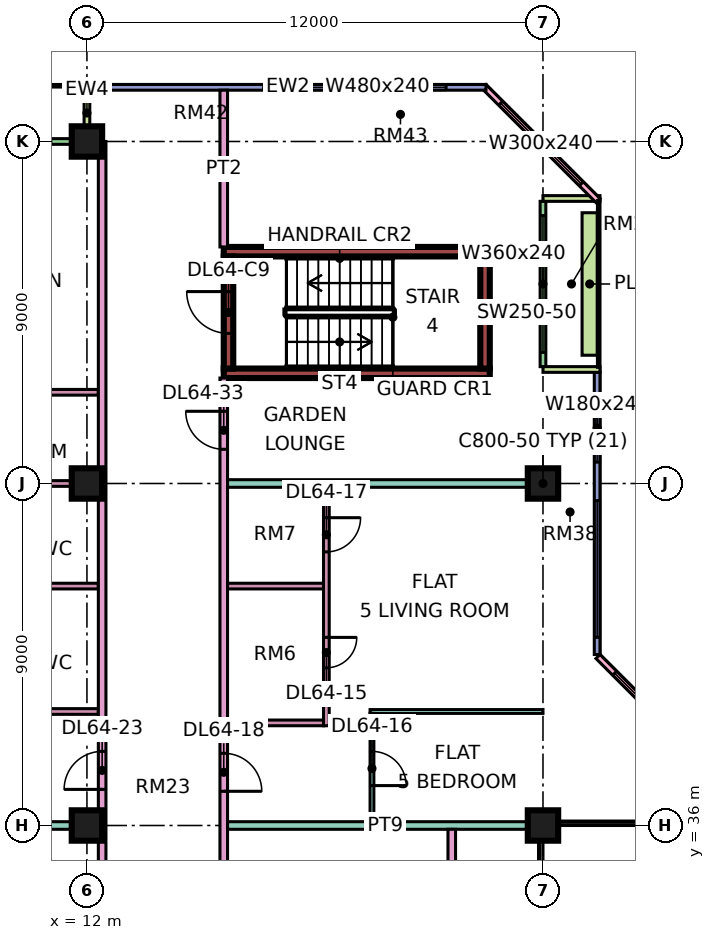
"""IFC4 building model, lengths in metres.
Left out: names, types, materials, properties, quantities, classifications, styles, units other than length and angle.
Written with IfcOpenShell. Run it as: python <this file> out.ifc"""

import sys

from ifc_helpers import new_model, si_unit, direction, frame, frame_2d, origin, origin_2d, place, context, subcontext, project, spatial, rectangle, extrude, element, fill, save


model = new_model("IFC4")
c1 = context("Model", 3, precision=1e-05, world=origin(), true_north=direction((0.0, 1.0)))
c2 = subcontext(c1, "Body", "Model", "MODEL_VIEW")
j1 = project(units=[si_unit("LENGTHUNIT", "METRE"), si_unit("PLANEANGLEUNIT", "RADIAN")], contexts=[c1])
p1 = place(None, origin())
s1 = spatial("IfcSite", under=j1, at=p1, CompositionType="ELEMENT")
p2 = place(p1, origin())
s2 = spatial("IfcBuilding", under=s1, at=p2, CompositionType="ELEMENT")
p3 = place(p2, frame((0.0, 0.0, 277.15)))
s3 = spatial("IfcBuildingStorey", under=s2, at=p3, CompositionType="ELEMENT", Elevation=277.15)
for number, where, z_axis, x_axis in (
    (1, (12.0, 36.0, 0.0), (0.0, 0.0, 1.0), (1.0, 0.0, 0.0)),
    (2, (12.0, 45.0, 0.0), (0.0, 0.0, 1.0), (1.0, 0.0, 0.0)),
    (3, (12.0, 54.0, 0.0), (0.0, 0.0, 1.0), (1.0, 0.0, 0.0)),
    (4, (24.0, 36.0, 0.0), (0.0, 0.0, 1.0), (1.0, 0.0, 0.0)),
    (5, (24.0, 45.0, 0.0), (0.0, 0.0, 1.0), (1.0, 0.0, 0.0)),
):
    element("IfcColumn", number, at=place(p3, frame(where, z_axis=z_axis, x_axis=x_axis)), inside=s3, PredefinedType="COLUMN", context=c2, shape_type="SweptSolid", body=[
        extrude(rectangle(XDim=0.8, YDim=0.8, at=origin_2d()), origin(), (0.0, 0.0, 1.0), 3.75),
    ])
for number, where, z_axis, x_axis in (
    (6, (15.6, 47.9, 0.0), (0.0, 0.0, 1.0), (1.0, 0.0, 0.0)),
    (7, (15.6, 51.1, 0.0), (0.0, 0.0, 1.0), (1.0, 0.0, 0.0)),
):
    element("IfcWall", number, at=place(p3, frame(where, z_axis=z_axis, x_axis=x_axis)), inside=s3, PredefinedType="SHEAR", context=c2, shape_type="SweptSolid", body=[
        extrude(rectangle(XDim=7.0, YDim=0.25, at=frame_2d((3.5, 0.0))), origin(), (0.0, 0.0, 1.0), 3.75),
    ])
p4 = place(p3, frame((15.725, 48.025, 0.0), z_axis=(0.0, 0.0, 1.0), x_axis=(0.0, 1.0, 0.0)))
e8 = element("IfcWall", 8, at=p4, inside=s3, PredefinedType="SHEAR", context=c2, shape_type="SweptSolid", body=[
    extrude(rectangle(XDim=2.95, YDim=0.25, at=frame_2d((1.475, 0.0))), origin(), (0.0, 0.0, 1.0), 3.75),
])
p5 = place(p4, frame((0.925, 0.0, 0.0)))
e9 = element("IfcOpeningElement", 9, at=p5, cuts=e8, PredefinedType="OPENING", context=c2, shape_type="SweptSolid", body=[
    extrude(rectangle(XDim=1.1, YDim=2.2, at=frame_2d((0.55, 1.1))), frame((0.0, 0.135, 0.0), z_axis=(0.0, -1.0, 0.0), x_axis=(1.0, 0.0, 0.0)), (0.0, 0.0, 1.0), 0.27),
])
p6 = place(p3, frame((22.475, 48.025, 0.0), z_axis=(0.0, 0.0, 1.0), x_axis=(0.0, 1.0, 0.0)))
e10 = element("IfcWall", 10, at=p6, inside=s3, PredefinedType="SHEAR", context=c2, shape_type="SweptSolid", body=[
    extrude(rectangle(XDim=2.95, YDim=0.25, at=frame_2d((1.475, 0.0))), origin(), (0.0, 0.0, 1.0), 3.75),
])
p7 = place(p3, frame((28.447, 37.447, 0.0), z_axis=(0.0, 0.0, 1.0), x_axis=(-0.707106781187, 0.707106781187, 0.0)))
e11 = element("IfcWall", 11, at=p7, inside=s3, PredefinedType="SOLIDWALL", context=c2, shape_type="SweptSolid", body=[
    extrude(rectangle(XDim=4.243, YDim=0.15, at=frame_2d((2.121, 0.0))), origin(), (0.0, 0.0, 1.0), 3.35),
])
p8 = place(p7, frame((0.621, 0.0, 0.45)))
e12 = element("IfcOpeningElement", 12, at=p8, cuts=e11, PredefinedType="OPENING", context=c2, shape_type="SweptSolid", body=[
    extrude(rectangle(XDim=3.0, YDim=2.4, at=frame_2d((1.5, 1.2))), frame((0.0, 0.085, 0.0), z_axis=(0.0, -1.0, 0.0), x_axis=(1.0, 0.0, 0.0)), (0.0, 0.0, 1.0), 0.17),
])
p9 = place(p3, frame((25.425, 40.5, 0.0), z_axis=(0.0, 0.0, 1.0), x_axis=(0.0, 1.0, 0.0)))
e13 = element("IfcWall", 13, at=p9, inside=s3, PredefinedType="SOLIDWALL", context=c2, shape_type="SweptSolid", body=[
    extrude(rectangle(XDim=7.425, YDim=0.15, at=frame_2d((3.712, 0.0))), origin(), (0.0, 0.0, 1.0), 3.35),
])
p10 = place(p9, frame((0.45, 0.0, 0.45)))
e14 = element("IfcOpeningElement", 14, at=p10, cuts=e13, PredefinedType="OPENING", context=c2, shape_type="SweptSolid", body=[
    extrude(rectangle(XDim=3.6, YDim=2.4, at=frame_2d((1.8, 1.2))), frame((0.0, 0.085, 0.0), z_axis=(0.0, -1.0, 0.0), x_axis=(1.0, 0.0, 0.0)), (0.0, 0.0, 1.0), 0.17),
])
p11 = place(p9, frame((5.062, 0.0, 0.45)))
e15 = element("IfcOpeningElement", 15, at=p11, cuts=e13, PredefinedType="OPENING", context=c2, shape_type="SweptSolid", body=[
    extrude(rectangle(XDim=1.8, YDim=2.4, at=frame_2d((0.9, 1.2))), frame((0.0, 0.085, 0.0), z_axis=(0.0, -1.0, 0.0), x_axis=(1.0, 0.0, 0.0)), (0.0, 0.0, 1.0), 0.17),
])
p12 = place(p3, frame((24.0, 48.075, 0.0), z_axis=(0.0, 0.0, 1.0), x_axis=(0.0, 1.0, 0.0)))
e16 = element("IfcWall", 16, at=p12, inside=s3, PredefinedType="SOLIDWALL", context=c2, shape_type="SweptSolid", body=[
    extrude(rectangle(XDim=4.35, YDim=0.15, at=frame_2d((2.175, 0.0))), origin(), (0.0, 0.0, 1.0), 3.35),
])
p13 = place(p12, frame((0.375, 0.0, 0.45)))
e17 = element("IfcOpeningElement", 17, at=p13, cuts=e16, PredefinedType="OPENING", context=c2, shape_type="SweptSolid", body=[
    extrude(rectangle(XDim=3.6, YDim=2.4, at=frame_2d((1.8, 1.2))), frame((0.0, 0.085, 0.0), z_axis=(0.0, -1.0, 0.0), x_axis=(1.0, 0.0, 0.0)), (0.0, 0.0, 1.0), 0.17),
])
for number, where, z_axis, x_axis in (
    (18, (25.5, 48.0, 0.0), (0.0, 0.0, 1.0), (-1.0, 0.0, 0.0)),
    (19, (25.5, 52.5, 0.0), (0.0, 0.0, 1.0), (-1.0, 0.0, 0.0)),
):
    element("IfcWall", number, at=place(p3, frame(where, z_axis=z_axis, x_axis=x_axis)), inside=s3, PredefinedType="SOLIDWALL", context=c2, shape_type="SweptSolid", body=[
        extrude(rectangle(XDim=1.5, YDim=0.15, at=frame_2d((0.75, 0.0))), origin(), (0.0, 0.0, 1.0), 3.35),
    ])
p14 = place(p3, frame((25.447, 52.447, 0.0), z_axis=(0.0, 0.0, 1.0), x_axis=(-0.707106781187, 0.707106781187, 0.0)))
e20 = element("IfcWall", 20, at=p14, inside=s3, PredefinedType="SOLIDWALL", context=c2, shape_type="SweptSolid", body=[
    extrude(rectangle(XDim=4.243, YDim=0.15, at=frame_2d((2.121, 0.0))), origin(), (0.0, 0.0, 1.0), 3.35),
])
p15 = place(p14, frame((0.621, 0.0, 0.45)))
e21 = element("IfcOpeningElement", 21, at=p15, cuts=e20, PredefinedType="OPENING", context=c2, shape_type="SweptSolid", body=[
    extrude(rectangle(XDim=3.0, YDim=2.4, at=frame_2d((1.5, 1.2))), frame((0.0, 0.085, 0.0), z_axis=(0.0, -1.0, 0.0), x_axis=(1.0, 0.0, 0.0)), (0.0, 0.0, 1.0), 0.17),
])
p16 = place(p3, frame((22.5, 55.425, 0.0), z_axis=(0.0, 0.0, 1.0), x_axis=(-1.0, 0.0, 0.0)))
e22 = element("IfcWall", 22, at=p16, inside=s3, PredefinedType="SOLIDWALL", context=c2, shape_type="SweptSolid", body=[
    extrude(rectangle(XDim=10.425, YDim=0.15, at=frame_2d((5.212, 0.0))), origin(), (0.0, 0.0, 1.0), 3.35),
])
p17 = place(p16, frame((1.05, 0.0, 0.45)))
e23 = element("IfcOpeningElement", 23, at=p17, cuts=e22, PredefinedType="OPENING", context=c2, shape_type="SweptSolid", body=[
    extrude(rectangle(XDim=4.8, YDim=2.4, at=frame_2d((2.4, 1.2))), frame((0.0, 0.085, 0.0), z_axis=(0.0, -1.0, 0.0), x_axis=(1.0, 0.0, 0.0)), (0.0, 0.0, 1.0), 0.17),
])
p18 = place(p3, frame((11.925, 54.0, 0.0), z_axis=(0.0, 0.0, 1.0), x_axis=(-1.0, 0.0, 0.0)))
e24 = element("IfcWall", 24, at=p18, inside=s3, PredefinedType="SOLIDWALL", context=c2, shape_type="SweptSolid", body=[
    extrude(rectangle(XDim=10.35, YDim=0.15, at=frame_2d((5.175, 0.0))), origin(), (0.0, 0.0, 1.0), 3.35),
])
p19 = place(p18, frame((0.875, 0.0, 0.45)))
e25 = element("IfcOpeningElement", 25, at=p19, cuts=e24, PredefinedType="OPENING", context=c2, shape_type="SweptSolid", body=[
    extrude(rectangle(XDim=3.0, YDim=2.4, at=frame_2d((1.5, 1.2))), frame((0.0, 0.085, 0.0), z_axis=(0.0, -1.0, 0.0), x_axis=(1.0, 0.0, 0.0)), (0.0, 0.0, 1.0), 0.17),
])
p20 = place(p18, frame((7.038, 0.0, 0.0)))
e26 = element("IfcOpeningElement", 26, at=p20, cuts=e24, PredefinedType="OPENING", context=c2, shape_type="SweptSolid", body=[
    extrude(rectangle(XDim=1.8, YDim=2.4, at=frame_2d((0.9, 1.2))), frame((0.0, 0.085, 0.0), z_axis=(0.0, -1.0, 0.0), x_axis=(1.0, 0.0, 0.0)), (0.0, 0.0, 1.0), 0.17),
])
p21 = place(p3, frame((12.0, 55.5, 0.0), z_axis=(0.0, 0.0, 1.0), x_axis=(0.0, -1.0, 0.0)))
e27 = element("IfcWall", 27, at=p21, inside=s3, PredefinedType="SOLIDWALL", context=c2, shape_type="SweptSolid", body=[
    extrude(rectangle(XDim=1.5, YDim=0.15, at=frame_2d((0.75, 0.0))), origin(), (0.0, 0.0, 1.0), 3.35),
])
p22 = place(p3, frame((25.229, 48.375, 0.0), z_axis=(0.0, 0.0, 1.0), x_axis=(0.0, 1.0, 0.0)))
e28 = element("IfcWall", 28, at=p22, inside=s3, PredefinedType="SOLIDWALL", context=c2, shape_type="SweptSolid", body=[
    extrude(rectangle(XDim=3.75, YDim=0.4, at=frame_2d((1.875, 0.0))), origin(), (0.0, 0.0, 1.0), 0.7),
])
p23 = place(p3, frame((0.0, 36.0, 0.0), z_axis=(0.0, 0.0, 1.0), x_axis=(1.0, 0.0, 0.0)))
e29 = element("IfcWall", 29, at=p23, inside=s3, PredefinedType="PARTITIONING", context=c2, shape_type="SweptSolid", body=[
    extrude(rectangle(XDim=12.3, YDim=0.2, at=frame_2d((6.15, 0.0))), origin(), (0.0, 0.0, 1.0), 3.35),
])
for number, where, z_axis, x_axis in (
    (30, (7.675, 39.0, 0.0), (0.0, 0.0, 1.0), (1.0, 0.0, 0.0)),
    (31, (7.675, 42.3, 0.0), (0.0, 0.0, 1.0), (1.0, 0.0, 0.0)),
    (32, (7.675, 45.0, 0.0), (0.0, 0.0, 1.0), (1.0, 0.0, 0.0)),
    (33, (7.675, 47.4, 0.0), (0.0, 0.0, 1.0), (1.0, 0.0, 0.0)),
):
    element("IfcWall", number, at=place(p3, frame(where, z_axis=z_axis, x_axis=x_axis)), inside=s3, PredefinedType="PARTITIONING", context=c2, shape_type="SweptSolid", body=[
        extrude(rectangle(XDim=4.625, YDim=0.15, at=frame_2d((2.312, 0.0))), origin(), (0.0, 0.0, 1.0), 3.35),
    ])
p24 = place(p3, frame((12.4, 20.0, 0.0), z_axis=(0.0, 0.0, 1.0), x_axis=(0.0, 1.0, 0.0)))
e34 = element("IfcWall", 34, at=p24, inside=s3, PredefinedType="PARTITIONING", context=c2, shape_type="SweptSolid", body=[
    extrude(rectangle(XDim=34.0, YDim=0.2, at=frame_2d((17.0, 0.0))), origin(), (0.0, 0.0, 1.0), 3.35),
])
p25 = place(p24, frame((16.95, 0.0, 0.0)))
e35 = element("IfcOpeningElement", 35, at=p25, cuts=e34, PredefinedType="OPENING", context=c2, shape_type="SweptSolid", body=[
    extrude(rectangle(XDim=1.0, YDim=2.1, at=frame_2d((0.5, 1.05))), frame((0.0, 0.11, 0.0), z_axis=(0.0, -1.0, 0.0), x_axis=(1.0, 0.0, 0.0)), (0.0, 0.0, 1.0), 0.22),
])
p26 = place(p24, frame((0.6, 0.0, 0.0)))
e36 = element("IfcOpeningElement", 36, at=p26, cuts=e34, PredefinedType="OPENING", context=c2, shape_type="SweptSolid", body=[
    extrude(rectangle(XDim=1.2, YDim=2.1, at=frame_2d((0.6, 1.05))), frame((0.0, 0.11, 0.0), z_axis=(0.0, -1.0, 0.0), x_axis=(1.0, 0.0, 0.0)), (0.0, 0.0, 1.0), 0.22),
])
p27 = place(p24, frame((13.65, 0.0, 0.0)))
e37 = element("IfcOpeningElement", 37, at=p27, cuts=e34, PredefinedType="OPENING", context=c2, shape_type="SweptSolid", body=[
    extrude(rectangle(XDim=1.0, YDim=2.1, at=frame_2d((0.5, 1.05))), frame((0.0, 0.11, 0.0), z_axis=(0.0, -1.0, 0.0), x_axis=(1.0, 0.0, 0.0)), (0.0, 0.0, 1.0), 0.22),
])
p28 = place(p3, frame((15.6, 20.0, 0.0), z_axis=(0.0, 0.0, 1.0), x_axis=(0.0, 1.0, 0.0)))
e38 = element("IfcWall", 38, at=p28, inside=s3, PredefinedType="PARTITIONING", context=c2, shape_type="SweptSolid", body=[
    extrude(rectangle(XDim=27.775, YDim=0.2, at=frame_2d((13.887, 0.0))), origin(), (0.0, 0.0, 1.0), 3.35),
])
p29 = place(p28, frame((5.95, 0.0, 0.0)))
e39 = element("IfcOpeningElement", 39, at=p29, cuts=e38, PredefinedType="OPENING", context=c2, shape_type="SweptSolid", body=[
    extrude(rectangle(XDim=1.0, YDim=2.1, at=frame_2d((0.5, 1.05))), frame((0.0, 0.11, 0.0), z_axis=(0.0, -1.0, 0.0), x_axis=(1.0, 0.0, 0.0)), (0.0, 0.0, 1.0), 0.22),
])
p30 = place(p28, frame((12.0, 0.0, 0.0)))
e40 = element("IfcOpeningElement", 40, at=p30, cuts=e38, PredefinedType="OPENING", context=c2, shape_type="SweptSolid", body=[
    extrude(rectangle(XDim=1.0, YDim=2.1, at=frame_2d((0.5, 1.05))), frame((0.0, 0.11, 0.0), z_axis=(0.0, -1.0, 0.0), x_axis=(1.0, 0.0, 0.0)), (0.0, 0.0, 1.0), 0.22),
])
p31 = place(p28, frame((16.9, 0.0, 0.0)))
e41 = element("IfcOpeningElement", 41, at=p31, cuts=e38, PredefinedType="OPENING", context=c2, shape_type="SweptSolid", body=[
    extrude(rectangle(XDim=1.0, YDim=2.1, at=frame_2d((0.5, 1.05))), frame((0.0, 0.11, 0.0), z_axis=(0.0, -1.0, 0.0), x_axis=(1.0, 0.0, 0.0)), (0.0, 0.0, 1.0), 0.22),
])
p32 = place(p28, frame((1.15, 0.0, 0.0)))
e42 = element("IfcOpeningElement", 42, at=p32, cuts=e38, PredefinedType="OPENING", context=c2, shape_type="SweptSolid", body=[
    extrude(rectangle(XDim=1.8, YDim=2.1, at=frame_2d((0.9, 1.05))), frame((0.0, 0.11, 0.0), z_axis=(0.0, -1.0, 0.0), x_axis=(1.0, 0.0, 0.0)), (0.0, 0.0, 1.0), 0.22),
])
p33 = place(p28, frame((25.9, 0.0, 0.0)))
e43 = element("IfcOpeningElement", 43, at=p33, cuts=e38, PredefinedType="OPENING", context=c2, shape_type="SweptSolid", body=[
    extrude(rectangle(XDim=1.0, YDim=2.1, at=frame_2d((0.5, 1.05))), frame((0.0, 0.11, 0.0), z_axis=(0.0, -1.0, 0.0), x_axis=(1.0, 0.0, 0.0)), (0.0, 0.0, 1.0), 0.22),
])
p34 = place(p3, frame((15.6, 51.225, 0.0), z_axis=(0.0, 0.0, 1.0), x_axis=(0.0, 1.0, 0.0)))
e44 = element("IfcWall", 44, at=p34, inside=s3, PredefinedType="PARTITIONING", context=c2, shape_type="SweptSolid", body=[
    extrude(rectangle(XDim=4.125, YDim=0.2, at=frame_2d((2.062, 0.0))), origin(), (0.0, 0.0, 1.0), 3.35),
])
p35 = place(p3, frame((15.7, 36.0, 0.0), z_axis=(0.0, 0.0, 1.0), x_axis=(1.0, 0.0, 0.0)))
e45 = element("IfcWall", 45, at=p35, inside=s3, PredefinedType="PARTITIONING", context=c2, shape_type="SweptSolid", body=[
    extrude(rectangle(XDim=8.3, YDim=0.2, at=frame_2d((4.15, 0.0))), origin(), (0.0, 0.0, 1.0), 3.35),
])
for number, where, z_axis, x_axis in (
    (46, (15.7, 38.7, 0.0), (0.0, 0.0, 1.0), (1.0, 0.0, 0.0)),
    (47, (15.7, 42.3, 0.0), (0.0, 0.0, 1.0), (1.0, 0.0, 0.0)),
):
    element("IfcWall", number, at=place(p3, frame(where, z_axis=z_axis, x_axis=x_axis)), inside=s3, PredefinedType="PARTITIONING", context=c2, shape_type="SweptSolid", body=[
        extrude(rectangle(XDim=2.525, YDim=0.15, at=frame_2d((1.263, 0.0))), origin(), (0.0, 0.0, 1.0), 3.35),
    ])
p36 = place(p3, frame((15.7, 45.0, 0.0), z_axis=(0.0, 0.0, 1.0), x_axis=(1.0, 0.0, 0.0)))
e48 = element("IfcWall", 48, at=p36, inside=s3, PredefinedType="PARTITIONING", context=c2, shape_type="SweptSolid", body=[
    extrude(rectangle(XDim=8.3, YDim=0.2, at=frame_2d((4.15, 0.0))), origin(), (0.0, 0.0, 1.0), 3.35),
])
p37 = place(p3, frame((18.3, 38.625, 0.0), z_axis=(0.0, 0.0, 1.0), x_axis=(0.0, 1.0, 0.0)))
e49 = element("IfcWall", 49, at=p37, inside=s3, PredefinedType="PARTITIONING", context=c2, shape_type="SweptSolid", body=[
    extrude(rectangle(XDim=6.275, YDim=0.15, at=frame_2d((3.137, 0.0))), origin(), (0.0, 0.0, 1.0), 3.35),
])
p38 = place(p37, frame((1.525, 0.0, 0.0)))
e50 = element("IfcOpeningElement", 50, at=p38, cuts=e49, PredefinedType="OPENING", context=c2, shape_type="SweptSolid", body=[
    extrude(rectangle(XDim=0.8, YDim=2.1, at=frame_2d((0.4, 1.05))), frame((0.0, 0.085, 0.0), z_axis=(0.0, -1.0, 0.0), x_axis=(1.0, 0.0, 0.0)), (0.0, 0.0, 1.0), 0.17),
])
p39 = place(p37, frame((4.575, 0.0, 0.0)))
e51 = element("IfcOpeningElement", 51, at=p39, cuts=e49, PredefinedType="OPENING", context=c2, shape_type="SweptSolid", body=[
    extrude(rectangle(XDim=0.9, YDim=2.1, at=frame_2d((0.45, 1.05))), frame((0.0, 0.085, 0.0), z_axis=(0.0, -1.0, 0.0), x_axis=(1.0, 0.0, 0.0)), (0.0, 0.0, 1.0), 0.17),
])
p40 = place(p3, frame((19.45, 39.0, 0.0), z_axis=(0.0, 0.0, 1.0), x_axis=(1.0, 0.0, 0.0)))
e52 = element("IfcWall", 52, at=p40, inside=s3, PredefinedType="PARTITIONING", context=c2, shape_type="SweptSolid", body=[
    extrude(rectangle(XDim=4.55, YDim=0.1, at=frame_2d((2.275, 0.0))), origin(), (0.0, 0.0, 1.0), 3.35),
])
p41 = place(p3, frame((19.5, 36.1, 0.0), z_axis=(0.0, 0.0, 1.0), x_axis=(0.0, 1.0, 0.0)))
e53 = element("IfcWall", 53, at=p41, inside=s3, PredefinedType="PARTITIONING", context=c2, shape_type="SweptSolid", body=[
    extrude(rectangle(XDim=2.85, YDim=0.1, at=frame_2d((1.425, 0.0))), origin(), (0.0, 0.0, 1.0), 3.35),
])
p42 = place(p41, frame((0.95, 0.0, 0.0)))
e54 = element("IfcOpeningElement", 54, at=p42, cuts=e53, PredefinedType="OPENING", context=c2, shape_type="SweptSolid", body=[
    extrude(rectangle(XDim=0.9, YDim=2.1, at=frame_2d((0.45, 1.05))), frame((0.0, 0.06, 0.0), z_axis=(0.0, -1.0, 0.0), x_axis=(1.0, 0.0, 0.0)), (0.0, 0.0, 1.0), 0.12),
])
p43 = place(p3, frame((21.6, 23.9, 0.0), z_axis=(0.0, 0.0, 1.0), x_axis=(0.0, 1.0, 0.0)))
e55 = element("IfcWall", 55, at=p43, inside=s3, PredefinedType="PARTITIONING", context=c2, shape_type="SweptSolid", body=[
    extrude(rectangle(XDim=12.0, YDim=0.2, at=frame_2d((6.0, 0.0))), origin(), (0.0, 0.0, 1.0), 3.35),
])
p44 = place(p8, origin())
e56 = element("IfcWindow", 56, at=p44, inside=s3, PartitioningType="SINGLE_PANEL", PredefinedType="WINDOW", context=c2, shape_type="SweptSolid", body=[
    extrude(rectangle(XDim=3.0, YDim=2.4, at=frame_2d((1.5, 1.2))), frame((0.0, 0.03, 0.0), z_axis=(0.0, -1.0, 0.0), x_axis=(1.0, 0.0, 0.0)), (0.0, 0.0, 1.0), 0.06),
])
fill(e12, e56)
p45 = place(p10, origin())
e57 = element("IfcWindow", 57, at=p45, inside=s3, PartitioningType="SINGLE_PANEL", PredefinedType="WINDOW", context=c2, shape_type="SweptSolid", body=[
    extrude(rectangle(XDim=3.6, YDim=2.4, at=frame_2d((1.8, 1.2))), frame((0.0, 0.03, 0.0), z_axis=(0.0, -1.0, 0.0), x_axis=(1.0, 0.0, 0.0)), (0.0, 0.0, 1.0), 0.06),
])
fill(e14, e57)
p46 = place(p11, origin())
e58 = element("IfcWindow", 58, at=p46, inside=s3, PartitioningType="SINGLE_PANEL", PredefinedType="WINDOW", context=c2, shape_type="SweptSolid", body=[
    extrude(rectangle(XDim=1.8, YDim=2.4, at=frame_2d((0.9, 1.2))), frame((0.0, 0.03, 0.0), z_axis=(0.0, -1.0, 0.0), x_axis=(1.0, 0.0, 0.0)), (0.0, 0.0, 1.0), 0.06),
])
fill(e15, e58)
p47 = place(p13, origin())
e59 = element("IfcWindow", 59, at=p47, inside=s3, PartitioningType="SINGLE_PANEL", PredefinedType="WINDOW", context=c2, shape_type="SweptSolid", body=[
    extrude(rectangle(XDim=3.6, YDim=2.4, at=frame_2d((1.8, 1.2))), frame((0.0, 0.03, 0.0), z_axis=(0.0, -1.0, 0.0), x_axis=(1.0, 0.0, 0.0)), (0.0, 0.0, 1.0), 0.06),
])
fill(e17, e59)
p48 = place(p15, origin())
e60 = element("IfcWindow", 60, at=p48, inside=s3, PartitioningType="SINGLE_PANEL", PredefinedType="WINDOW", context=c2, shape_type="SweptSolid", body=[
    extrude(rectangle(XDim=3.0, YDim=2.4, at=frame_2d((1.5, 1.2))), frame((0.0, 0.03, 0.0), z_axis=(0.0, -1.0, 0.0), x_axis=(1.0, 0.0, 0.0)), (0.0, 0.0, 1.0), 0.06),
])
fill(e21, e60)
p49 = place(p17, origin())
e61 = element("IfcWindow", 61, at=p49, inside=s3, PartitioningType="SINGLE_PANEL", PredefinedType="WINDOW", context=c2, shape_type="SweptSolid", body=[
    extrude(rectangle(XDim=4.8, YDim=2.4, at=frame_2d((2.4, 1.2))), frame((0.0, 0.03, 0.0), z_axis=(0.0, -1.0, 0.0), x_axis=(1.0, 0.0, 0.0)), (0.0, 0.0, 1.0), 0.06),
])
fill(e23, e61)
p50 = place(p5, frame((1.1, 0.0, 0.0), z_axis=(0.0, 0.0, 1.0), x_axis=(-1.0, 0.0, 0.0)))
e62 = element("IfcDoor", 62, at=p50, inside=s3, OperationType="SINGLE_SWING_RIGHT", PredefinedType="DOOR", context=c2, shape_type="SweptSolid", body=[
    extrude(rectangle(XDim=1.1, YDim=2.2, at=frame_2d((0.55, 1.1))), frame((0.0, 0.025, 0.0), z_axis=(0.0, -1.0, 0.0), x_axis=(1.0, 0.0, 0.0)), (0.0, 0.0, 1.0), 0.05),
])
fill(e9, e62)
p51 = place(p38, origin())
e63 = element("IfcDoor", 63, at=p51, inside=s3, OperationType="SINGLE_SWING_RIGHT", PredefinedType="DOOR", context=c2, shape_type="SweptSolid", body=[
    extrude(rectangle(XDim=0.8, YDim=2.1, at=frame_2d((0.4, 1.05))), frame((0.0, 0.025, 0.0), z_axis=(0.0, -1.0, 0.0), x_axis=(1.0, 0.0, 0.0)), (0.0, 0.0, 1.0), 0.05),
])
fill(e50, e63)
p52 = place(p42, frame((0.9, 0.0, 0.0), z_axis=(0.0, 0.0, 1.0), x_axis=(-1.0, 0.0, 0.0)))
e64 = element("IfcDoor", 64, at=p52, inside=s3, OperationType="SINGLE_SWING_LEFT", PredefinedType="DOOR", context=c2, shape_type="SweptSolid", body=[
    extrude(rectangle(XDim=0.9, YDim=2.1, at=frame_2d((0.45, 1.05))), frame((0.0, 0.025, 0.0), z_axis=(0.0, -1.0, 0.0), x_axis=(1.0, 0.0, 0.0)), (0.0, 0.0, 1.0), 0.05),
])
fill(e54, e64)
p53 = place(p39, origin())
e65 = element("IfcDoor", 65, at=p53, inside=s3, OperationType="SINGLE_SWING_RIGHT", PredefinedType="DOOR", context=c2, shape_type="SweptSolid", body=[
    extrude(rectangle(XDim=0.9, YDim=2.1, at=frame_2d((0.45, 1.05))), frame((0.0, 0.025, 0.0), z_axis=(0.0, -1.0, 0.0), x_axis=(1.0, 0.0, 0.0)), (0.0, 0.0, 1.0), 0.05),
])
fill(e51, e65)
p54 = place(p31, frame((1.0, 0.0, 0.0), z_axis=(0.0, 0.0, 1.0), x_axis=(-1.0, 0.0, 0.0)))
e66 = element("IfcDoor", 66, at=p54, inside=s3, OperationType="SINGLE_SWING_LEFT", PredefinedType="DOOR", context=c2, shape_type="SweptSolid", body=[
    extrude(rectangle(XDim=1.0, YDim=2.1, at=frame_2d((0.5, 1.05))), frame((0.0, 0.025, 0.0), z_axis=(0.0, -1.0, 0.0), x_axis=(1.0, 0.0, 0.0)), (0.0, 0.0, 1.0), 0.05),
])
fill(e41, e66)
p55 = place(p25, origin())
e67 = element("IfcDoor", 67, at=p55, inside=s3, OperationType="SINGLE_SWING_LEFT", PredefinedType="DOOR", context=c2, shape_type="SweptSolid", body=[
    extrude(rectangle(XDim=1.0, YDim=2.1, at=frame_2d((0.5, 1.05))), frame((0.0, 0.025, 0.0), z_axis=(0.0, -1.0, 0.0), x_axis=(1.0, 0.0, 0.0)), (0.0, 0.0, 1.0), 0.05),
])
fill(e35, e67)
p56 = place(p33, frame((1.0, 0.0, 0.0), z_axis=(0.0, 0.0, 1.0), x_axis=(-1.0, 0.0, 0.0)))
e68 = element("IfcDoor", 68, at=p56, inside=s3, OperationType="SINGLE_SWING_RIGHT", PredefinedType="DOOR", context=c2, shape_type="SweptSolid", body=[
    extrude(rectangle(XDim=1.0, YDim=2.1, at=frame_2d((0.5, 1.05))), frame((0.0, 0.025, 0.0), z_axis=(0.0, -1.0, 0.0), x_axis=(1.0, 0.0, 0.0)), (0.0, 0.0, 1.0), 0.05),
])
fill(e43, e68)
save(model, sys.argv[1])
